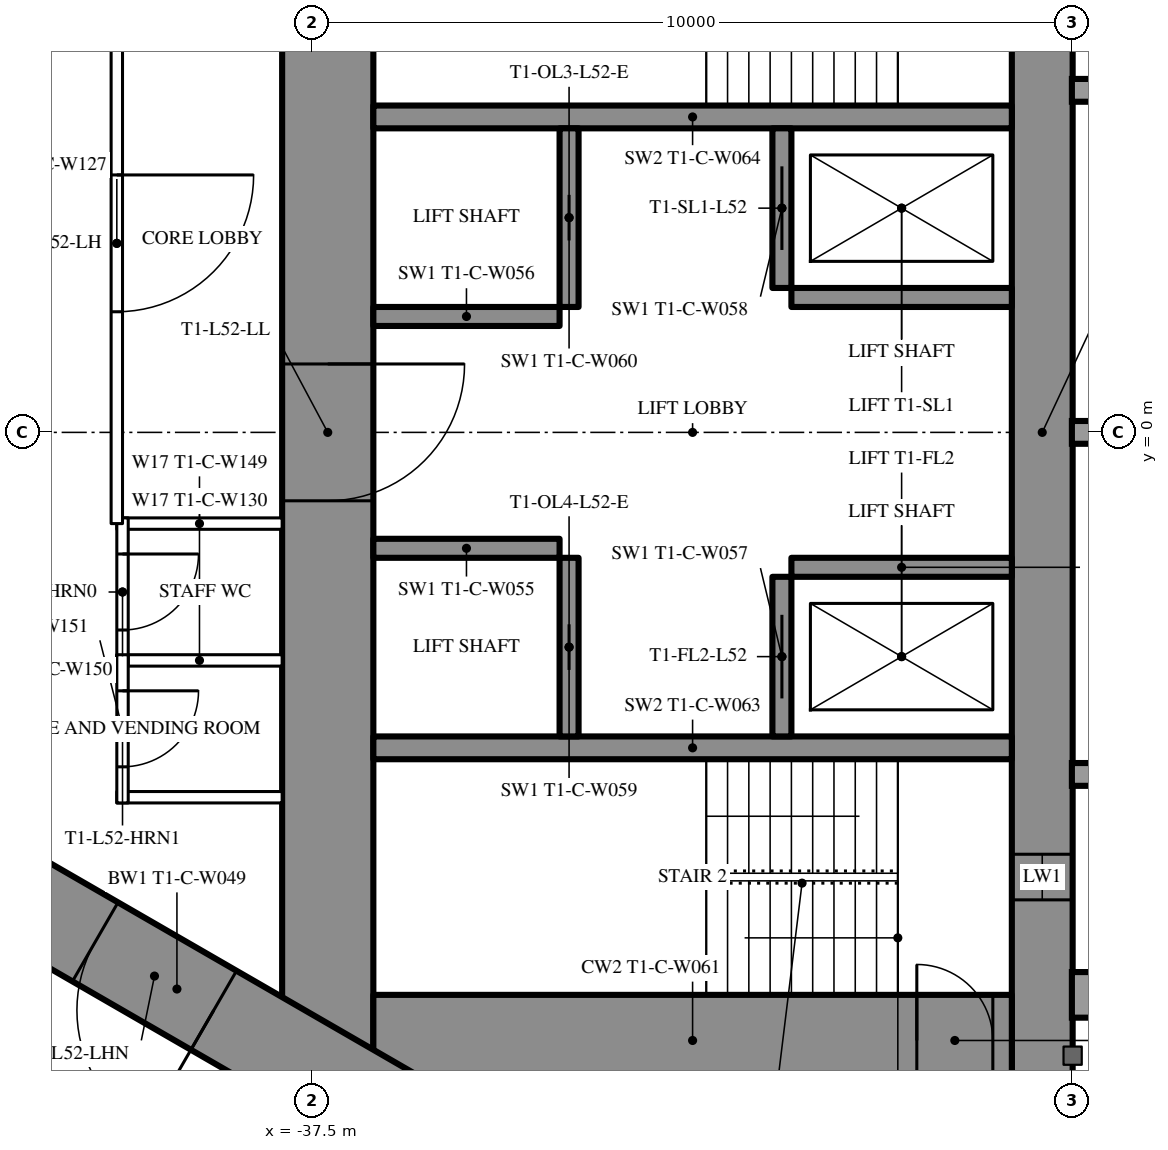
"""IFC4 building model, lengths in metres.
Left out: names, types, materials, properties, quantities, classifications, styles, units other than length and angle.
Written with IfcOpenShell. Run it as: python <this file> out.ifc"""

import sys

from ifc_helpers import new_model, si_unit, direction, frame, frame_2d, origin, place, context, subcontext, project, spatial, rectangle, extrude, element, fill, save


model = new_model("IFC4")
c1 = context("Model", 3, precision=1e-05, world=origin(), true_north=direction((0.0, 1.0)))
c2 = subcontext(c1, "Body", "Model", "MODEL_VIEW")
j1 = project(units=[si_unit("LENGTHUNIT", "METRE"), si_unit("PLANEANGLEUNIT", "RADIAN")], contexts=[c1])
p1 = place(None, origin())
s1 = spatial("IfcSite", under=j1, at=p1, CompositionType="ELEMENT")
p2 = place(p1, origin())
s2 = spatial("IfcBuilding", under=s1, at=p2, CompositionType="ELEMENT")
p3 = place(p2, frame((0.0, 0.0, 194.8)))
s3 = spatial("IfcBuildingStorey", under=s2, at=p3, CompositionType="ELEMENT", Elevation=194.8)
p4 = place(p3, frame((-27.9, 8.6, 0.0), z_axis=(0.0, 0.0, 1.0), x_axis=(0.0, -1.0, 0.0)))
e1 = element("IfcWall", 1, at=p4, inside=s3, PredefinedType="SHEAR", context=c2, shape_type="SweptSolid", body=[
    extrude(rectangle(XDim=17.2, YDim=0.8, at=frame_2d((8.6, 0.0))), origin(), (0.0, 0.0, 1.0), 3.5),
])
p5 = place(p4, frame((2.45, 0.0, 0.6)))
e2 = element("IfcOpeningElement", 2, at=p5, cuts=e1, PredefinedType="OPENING", context=c2, shape_type="SweptSolid", body=[
    extrude(rectangle(XDim=0.6, YDim=2.1, at=frame_2d((0.3, 1.05))), frame((0.0, 0.41, 0.0), z_axis=(0.0, -1.0, 0.0), x_axis=(1.0, 0.0, 0.0)), (0.0, 0.0, 1.0), 0.82),
])
p6 = place(p4, frame((14.15, 0.0, 0.6)))
e3 = element("IfcOpeningElement", 3, at=p6, cuts=e1, PredefinedType="OPENING", context=c2, shape_type="SweptSolid", body=[
    extrude(rectangle(XDim=0.6, YDim=2.1, at=frame_2d((0.3, 1.05))), frame((0.0, 0.41, 0.0), z_axis=(0.0, -1.0, 0.0), x_axis=(1.0, 0.0, 0.0)), (0.0, 0.0, 1.0), 0.82),
])
p7 = place(p3, frame((-37.3, 8.6, 0.0), z_axis=(0.0, 0.0, 1.0), x_axis=(0.0, -1.0, 0.0)))
e4 = element("IfcWall", 4, at=p7, inside=s3, PredefinedType="SHEAR", context=c2, shape_type="SweptSolid", body=[
    extrude(rectangle(XDim=17.2, YDim=1.2, at=frame_2d((8.6, 0.0))), origin(), (0.0, 0.0, 1.0), 3.5),
])
p8 = place(p7, frame((7.7, 0.0, 0.0)))
e5 = element("IfcOpeningElement", 5, at=p8, cuts=e4, PredefinedType="OPENING", context=c2, shape_type="SweptSolid", body=[
    extrude(rectangle(XDim=1.8, YDim=2.2, at=frame_2d((0.9, 1.1))), frame((0.0, 0.61, 0.0), z_axis=(0.0, -1.0, 0.0), x_axis=(1.0, 0.0, 0.0)), (0.0, 0.0, 1.0), 1.22),
])
p9 = place(p3, frame((-28.3, -8.0, 0.0), z_axis=(0.0, 0.0, 1.0), x_axis=(-1.0, 0.0, 0.0)))
e6 = element("IfcWall", 6, at=p9, inside=s3, PredefinedType="SHEAR", context=c2, shape_type="SweptSolid", body=[
    extrude(rectangle(XDim=8.4, YDim=1.2, at=frame_2d((4.2, 0.0))), origin(), (0.0, 0.0, 1.0), 3.5),
])
p10 = place(p9, frame((0.25, 0.0, 0.0)))
e7 = element("IfcOpeningElement", 7, at=p10, cuts=e6, PredefinedType="OPENING", context=c2, shape_type="SweptSolid", body=[
    extrude(rectangle(XDim=1.0, YDim=2.2, at=frame_2d((0.5, 1.1))), frame((0.0, 0.61, 0.0), z_axis=(0.0, -1.0, 0.0), x_axis=(1.0, 0.0, 0.0)), (0.0, 0.0, 1.0), 1.22),
])
for number, where, z_axis, x_axis in (
    (8, (-28.3, 4.15, 0.0), (0.0, 0.0, 1.0), (-1.0, 0.0, 0.0)),
    (9, (-28.3, -4.15, 0.0), (0.0, 0.0, 1.0), (-1.0, 0.0, 0.0)),
):
    element("IfcWall", number, at=place(p3, frame(where, z_axis=z_axis, x_axis=x_axis)), inside=s3, PredefinedType="SHEAR", context=c2, shape_type="SweptSolid", body=[
        extrude(rectangle(XDim=8.4, YDim=0.3, at=frame_2d((4.2, 0.0))), origin(), (0.0, 0.0, 1.0), 3.5),
    ])
p11 = place(p3, frame((-31.325, 4.0, 0.0), z_axis=(0.0, 0.0, 1.0), x_axis=(0.0, -1.0, 0.0)))
e10 = element("IfcWall", 10, at=p11, inside=s3, PredefinedType="SHEAR", context=c2, shape_type="SweptSolid", body=[
    extrude(rectangle(XDim=2.1, YDim=0.25, at=frame_2d((1.05, 0.0))), origin(), (0.0, 0.0, 1.0), 3.5),
])
p12 = place(p11, frame((0.5, 0.0, 0.0)))
e11 = element("IfcOpeningElement", 11, at=p12, cuts=e10, PredefinedType="OPENING", context=c2, shape_type="SweptSolid", body=[
    extrude(rectangle(XDim=1.1, YDim=2.2, at=frame_2d((0.55, 1.1))), frame((0.0, 0.135, 0.0), z_axis=(0.0, -1.0, 0.0), x_axis=(1.0, 0.0, 0.0)), (0.0, 0.0, 1.0), 0.27),
])
p13 = place(p3, frame((-34.125, 4.0, 0.0), z_axis=(0.0, 0.0, 1.0), x_axis=(0.0, -1.0, 0.0)))
e12 = element("IfcWall", 12, at=p13, inside=s3, PredefinedType="SHEAR", context=c2, shape_type="SweptSolid", body=[
    extrude(rectangle(XDim=2.35, YDim=0.25, at=frame_2d((1.175, 0.0))), origin(), (0.0, 0.0, 1.0), 3.5),
])
p14 = place(p13, frame((0.875, 0.0, 0.0)))
e13 = element("IfcOpeningElement", 13, at=p14, cuts=e12, PredefinedType="OPENING", context=c2, shape_type="SweptSolid", body=[
    extrude(rectangle(XDim=0.6, YDim=2.0, at=frame_2d((0.3, 1.0))), frame((0.0, 0.135, 0.0), z_axis=(0.0, -1.0, 0.0), x_axis=(1.0, 0.0, 0.0)), (0.0, 0.0, 1.0), 0.27),
])
p15 = place(p3, frame((-28.3, 1.775, 0.0), z_axis=(0.0, 0.0, 1.0), x_axis=(-1.0, 0.0, 0.0)))
e14 = element("IfcWall", 14, at=p15, inside=s3, PredefinedType="SHEAR", context=c2, shape_type="SweptSolid", body=[
    extrude(rectangle(XDim=2.9, YDim=0.25, at=frame_2d((1.45, 0.0))), origin(), (0.0, 0.0, 1.0), 3.5),
])
p16 = place(p3, frame((-34.25, 1.525, 0.0), z_axis=(0.0, 0.0, 1.0), x_axis=(-1.0, 0.0, 0.0)))
e15 = element("IfcWall", 15, at=p16, inside=s3, PredefinedType="SHEAR", context=c2, shape_type="SweptSolid", body=[
    extrude(rectangle(XDim=2.45, YDim=0.25, at=frame_2d((1.225, 0.0))), origin(), (0.0, 0.0, 1.0), 3.5),
])
p17 = place(p3, frame((-31.325, -1.9, 0.0), z_axis=(0.0, 0.0, 1.0), x_axis=(0.0, -1.0, 0.0)))
e16 = element("IfcWall", 16, at=p17, inside=s3, PredefinedType="SHEAR", context=c2, shape_type="SweptSolid", body=[
    extrude(rectangle(XDim=2.1, YDim=0.25, at=frame_2d((1.05, 0.0))), origin(), (0.0, 0.0, 1.0), 3.5),
])
p18 = place(p17, frame((0.5, 0.0, 0.0)))
e17 = element("IfcOpeningElement", 17, at=p18, cuts=e16, PredefinedType="OPENING", context=c2, shape_type="SweptSolid", body=[
    extrude(rectangle(XDim=1.1, YDim=2.2, at=frame_2d((0.55, 1.1))), frame((0.0, 0.135, 0.0), z_axis=(0.0, -1.0, 0.0), x_axis=(1.0, 0.0, 0.0)), (0.0, 0.0, 1.0), 0.27),
])
p19 = place(p3, frame((-34.125, -1.65, 0.0), z_axis=(0.0, 0.0, 1.0), x_axis=(0.0, -1.0, 0.0)))
e18 = element("IfcWall", 18, at=p19, inside=s3, PredefinedType="SHEAR", context=c2, shape_type="SweptSolid", body=[
    extrude(rectangle(XDim=2.35, YDim=0.25, at=frame_2d((1.175, 0.0))), origin(), (0.0, 0.0, 1.0), 3.5),
])
p20 = place(p19, frame((0.875, 0.0, 0.0)))
e19 = element("IfcOpeningElement", 19, at=p20, cuts=e18, PredefinedType="OPENING", context=c2, shape_type="SweptSolid", body=[
    extrude(rectangle(XDim=0.6, YDim=2.0, at=frame_2d((0.3, 1.0))), frame((0.0, 0.135, 0.0), z_axis=(0.0, -1.0, 0.0), x_axis=(1.0, 0.0, 0.0)), (0.0, 0.0, 1.0), 0.27),
])
p21 = place(p3, frame((-28.3, -1.775, 0.0), z_axis=(0.0, 0.0, 1.0), x_axis=(-1.0, 0.0, 0.0)))
e20 = element("IfcWall", 20, at=p21, inside=s3, PredefinedType="SHEAR", context=c2, shape_type="SweptSolid", body=[
    extrude(rectangle(XDim=2.9, YDim=0.25, at=frame_2d((1.45, 0.0))), origin(), (0.0, 0.0, 1.0), 3.5),
])
p22 = place(p3, frame((-34.25, -1.525, 0.0), z_axis=(0.0, 0.0, 1.0), x_axis=(-1.0, 0.0, 0.0)))
e21 = element("IfcWall", 21, at=p22, inside=s3, PredefinedType="SHEAR", context=c2, shape_type="SweptSolid", body=[
    extrude(rectangle(XDim=2.45, YDim=0.25, at=frame_2d((1.225, 0.0))), origin(), (0.0, 0.0, 1.0), 3.5),
])
p23 = place(p3, frame((-27.2, 14.3, 0.0), z_axis=(0.0, 0.0, 1.0), x_axis=(-0.866026593062, -0.499997940104, 0.0)))
e22 = element("IfcWall", 22, at=p23, inside=s3, PredefinedType="SHEAR", context=c2, shape_type="SweptSolid", body=[
    extrude(rectangle(XDim=28.946, YDim=1.2, at=frame_2d((14.473, 0.0))), origin(), (0.0, 0.0, 1.0), 3.5),
])
p24 = place(p23, frame((4.6, 0.0, 0.0)))
e23 = element("IfcOpeningElement", 23, at=p24, cuts=e22, PredefinedType="OPENING", context=c2, shape_type="SweptSolid", body=[
    extrude(rectangle(XDim=1.0, YDim=2.2, at=frame_2d((0.5, 1.1))), frame((0.0, 0.61, 0.0), z_axis=(0.0, -1.0, 0.0), x_axis=(1.0, 0.0, 0.0)), (0.0, 0.0, 1.0), 1.22),
])
p25 = place(p23, frame((13.395, 0.0, 0.0)))
e24 = element("IfcOpeningElement", 24, at=p25, cuts=e22, PredefinedType="OPENING", context=c2, shape_type="SweptSolid", body=[
    extrude(rectangle(XDim=1.8, YDim=2.2, at=frame_2d((0.9, 1.1))), frame((0.0, 0.61, 0.0), z_axis=(0.0, -1.0, 0.0), x_axis=(1.0, 0.0, 0.0)), (0.0, 0.0, 1.0), 1.22),
])
p26 = place(p3, frame((-27.2, -14.3, 0.0), z_axis=(0.0, 0.0, 1.0), x_axis=(-0.866024021859, 0.500002393557, 0.0)))
e25 = element("IfcWall", 25, at=p26, inside=s3, PredefinedType="SHEAR", context=c2, shape_type="SweptSolid", body=[
    extrude(rectangle(XDim=27.907, YDim=1.2, at=frame_2d((13.954, 0.0))), origin(), (0.0, 0.0, 1.0), 3.5),
])
p27 = place(p26, frame((4.6, 0.0, 0.0)))
e26 = element("IfcOpeningElement", 26, at=p27, cuts=e25, PredefinedType="OPENING", context=c2, shape_type="SweptSolid", body=[
    extrude(rectangle(XDim=1.0, YDim=2.2, at=frame_2d((0.5, 1.1))), frame((0.0, 0.61, 0.0), z_axis=(0.0, -1.0, 0.0), x_axis=(1.0, 0.0, 0.0)), (0.0, 0.0, 1.0), 1.22),
])
p28 = place(p26, frame((13.395, 0.0, 0.0)))
e27 = element("IfcOpeningElement", 27, at=p28, cuts=e25, PredefinedType="OPENING", context=c2, shape_type="SweptSolid", body=[
    extrude(rectangle(XDim=1.8, YDim=2.2, at=frame_2d((0.9, 1.1))), frame((0.0, 0.61, 0.0), z_axis=(0.0, -1.0, 0.0), x_axis=(1.0, 0.0, 0.0)), (0.0, 0.0, 1.0), 1.22),
])
p29 = place(p3, frame((-27.86, 16.575, 0.0), z_axis=(0.0, 0.0, 1.0), x_axis=(-0.866025533911, -0.499999774615, 0.0)))
e28 = element("IfcWall", 28, at=p29, inside=s3, PredefinedType="PARTITIONING", context=c2, shape_type="SweptSolid", body=[
    extrude(rectangle(XDim=33.149, YDim=0.2, at=frame_2d((16.575, 0.0))), origin(), (0.0, 0.0, 1.0), 3.25),
])
p30 = place(p29, frame((3.75, 0.0, 0.0)))
e29 = element("IfcOpeningElement", 29, at=p30, cuts=e28, PredefinedType="OPENING", context=c2, shape_type="SweptSolid", body=[
    extrude(rectangle(XDim=1.0, YDim=2.2, at=frame_2d((0.5, 1.1))), frame((0.0, 0.11, 0.0), z_axis=(0.0, -1.0, 0.0), x_axis=(1.0, 0.0, 0.0)), (0.0, 0.0, 1.0), 0.22),
])
p31 = place(p29, frame((16.402, 0.0, 0.0)))
e30 = element("IfcOpeningElement", 30, at=p31, cuts=e28, PredefinedType="OPENING", context=c2, shape_type="SweptSolid", body=[
    extrude(rectangle(XDim=0.95, YDim=2.2, at=frame_2d((0.475, 1.1))), frame((0.0, 0.11, 0.0), z_axis=(0.0, -1.0, 0.0), x_axis=(1.0, 0.0, 0.0)), (0.0, 0.0, 1.0), 0.22),
])
p32 = place(p29, frame((22.047, 0.0, 0.0)))
e31 = element("IfcOpeningElement", 31, at=p32, cuts=e28, PredefinedType="OPENING", context=c2, shape_type="SweptSolid", body=[
    extrude(rectangle(XDim=0.95, YDim=2.2, at=frame_2d((0.475, 1.1))), frame((0.0, 0.11, 0.0), z_axis=(0.0, -1.0, 0.0), x_axis=(1.0, 0.0, 0.0)), (0.0, 0.0, 1.0), 0.22),
])
p33 = place(p29, frame((30.396, 0.0, 0.0)))
e32 = element("IfcOpeningElement", 32, at=p33, cuts=e28, PredefinedType="OPENING", context=c2, shape_type="SweptSolid", body=[
    extrude(rectangle(XDim=1.8, YDim=2.2, at=frame_2d((0.9, 1.1))), frame((0.0, 0.11, 0.0), z_axis=(0.0, -1.0, 0.0), x_axis=(1.0, 0.0, 0.0)), (0.0, 0.0, 1.0), 0.22),
])
for number, where, z_axis, x_axis in (
    (33, (-37.9, -1.2, 0.0), (0.0, 0.0, 1.0), (-1.0, 0.0, 0.0)),
    (34, (-37.9, -3.0, 0.0), (0.0, 0.0, 1.0), (-1.0, 0.0, 0.0)),
    (35, (-37.9, -4.8, 0.0), (0.0, 0.0, 1.0), (-1.0, 0.0, 0.0)),
):
    element("IfcWall", number, at=place(p3, frame(where, z_axis=z_axis, x_axis=x_axis)), inside=s3, PredefinedType="PARTITIONING", context=c2, shape_type="SweptSolid", body=[
        extrude(rectangle(XDim=2.175, YDim=0.15, at=frame_2d((1.087, 0.0))), origin(), (0.0, 0.0, 1.0), 3.25),
    ])
p34 = place(p3, frame((-40.0, -1.125, 0.0), z_axis=(0.0, 0.0, 1.0), x_axis=(0.0, -1.0, 0.0)))
e36 = element("IfcWall", 36, at=p34, inside=s3, PredefinedType="PARTITIONING", context=c2, shape_type="SweptSolid", body=[
    extrude(rectangle(XDim=1.95, YDim=0.15, at=frame_2d((0.975, 0.0))), origin(), (0.0, 0.0, 1.0), 3.25),
])
p35 = place(p34, frame((0.475, 0.0, 0.0)))
e37 = element("IfcOpeningElement", 37, at=p35, cuts=e36, PredefinedType="OPENING", context=c2, shape_type="SweptSolid", body=[
    extrude(rectangle(XDim=1.0, YDim=2.2, at=frame_2d((0.5, 1.1))), frame((0.0, 0.085, 0.0), z_axis=(0.0, -1.0, 0.0), x_axis=(1.0, 0.0, 0.0)), (0.0, 0.0, 1.0), 0.17),
])
p36 = place(p3, frame((-40.0, -2.925, 0.0), z_axis=(0.0, 0.0, 1.0), x_axis=(0.0, -1.0, 0.0)))
e38 = element("IfcWall", 38, at=p36, inside=s3, PredefinedType="PARTITIONING", context=c2, shape_type="SweptSolid", body=[
    extrude(rectangle(XDim=1.95, YDim=0.15, at=frame_2d((0.975, 0.0))), origin(), (0.0, 0.0, 1.0), 3.25),
])
p37 = place(p36, frame((0.475, 0.0, 0.0)))
e39 = element("IfcOpeningElement", 39, at=p37, cuts=e38, PredefinedType="OPENING", context=c2, shape_type="SweptSolid", body=[
    extrude(rectangle(XDim=1.0, YDim=2.2, at=frame_2d((0.5, 1.1))), frame((0.0, 0.085, 0.0), z_axis=(0.0, -1.0, 0.0), x_axis=(1.0, 0.0, 0.0)), (0.0, 0.0, 1.0), 0.17),
])
p38 = place(p3, frame((-40.075, 6.174, 0.0), z_axis=(0.0, 0.0, 1.0), x_axis=(0.0, -1.0, 0.0)))
e40 = element("IfcWall", 40, at=p38, inside=s3, PredefinedType="PARTITIONING", context=c2, shape_type="SweptSolid", body=[
    extrude(rectangle(XDim=7.374, YDim=0.15, at=frame_2d((3.687, 0.0))), origin(), (0.0, 0.0, 1.0), 3.25),
])
p39 = place(p38, frame((2.787, 0.0, 0.0)))
e41 = element("IfcOpeningElement", 41, at=p39, cuts=e40, PredefinedType="OPENING", context=c2, shape_type="SweptSolid", body=[
    extrude(rectangle(XDim=1.8, YDim=2.2, at=frame_2d((0.9, 1.1))), frame((0.0, 0.085, 0.0), z_axis=(0.0, -1.0, 0.0), x_axis=(1.0, 0.0, 0.0)), (0.0, 0.0, 1.0), 0.17),
])
p40 = place(p3, frame((-39.758, -11.697, 0.0), z_axis=(0.0, 0.0, 1.0), x_axis=(-0.866024194504, 0.500002094529, 0.0)))
e42 = element("IfcWall", 42, at=p40, inside=s3, PredefinedType="PARTITIONING", context=c2, shape_type="SweptSolid", body=[
    extrude(rectangle(XDim=6.6, YDim=0.25, at=frame_2d((3.3, 0.0))), origin(), (0.0, 0.0, 1.0), 3.25),
])
p41 = place(p40, frame((0.75, 0.0, 0.0)))
e43 = element("IfcOpeningElement", 43, at=p41, cuts=e42, PredefinedType="OPENING", context=c2, shape_type="SweptSolid", body=[
    extrude(rectangle(XDim=1.1, YDim=2.2, at=frame_2d((0.55, 1.1))), frame((0.0, 0.135, 0.0), z_axis=(0.0, -1.0, 0.0), x_axis=(1.0, 0.0, 0.0)), (0.0, 0.0, 1.0), 0.27),
])
p42 = place(p40, frame((2.75, 0.0, 0.0)))
e44 = element("IfcOpeningElement", 44, at=p42, cuts=e42, PredefinedType="OPENING", context=c2, shape_type="SweptSolid", body=[
    extrude(rectangle(XDim=1.1, YDim=2.2, at=frame_2d((0.55, 1.1))), frame((0.0, 0.135, 0.0), z_axis=(0.0, -1.0, 0.0), x_axis=(1.0, 0.0, 0.0)), (0.0, 0.0, 1.0), 0.27),
])
p43 = place(p40, frame((4.75, 0.0, 0.0)))
e45 = element("IfcOpeningElement", 45, at=p43, cuts=e42, PredefinedType="OPENING", context=c2, shape_type="SweptSolid", body=[
    extrude(rectangle(XDim=1.1, YDim=2.2, at=frame_2d((0.55, 1.1))), frame((0.0, 0.135, 0.0), z_axis=(0.0, -1.0, 0.0), x_axis=(1.0, 0.0, 0.0)), (0.0, 0.0, 1.0), 0.27),
])
p44 = place(p35, origin())
e46 = element("IfcDoor", 46, at=p44, inside=s3, OperationType="SINGLE_SWING_LEFT", PredefinedType="DOOR", context=c2, shape_type="SweptSolid", body=[
    extrude(rectangle(XDim=1.0, YDim=2.2, at=frame_2d((0.5, 1.1))), frame((0.0, 0.025, 0.0), z_axis=(0.0, -1.0, 0.0), x_axis=(1.0, 0.0, 0.0)), (0.0, 0.0, 1.0), 0.05),
])
fill(e37, e46)
p45 = place(p37, origin())
e47 = element("IfcDoor", 47, at=p45, inside=s3, OperationType="SINGLE_SWING_LEFT", PredefinedType="DOOR", context=c2, shape_type="SweptSolid", body=[
    extrude(rectangle(XDim=1.0, YDim=2.2, at=frame_2d((0.5, 1.1))), frame((0.0, 0.025, 0.0), z_axis=(0.0, -1.0, 0.0), x_axis=(1.0, 0.0, 0.0)), (0.0, 0.0, 1.0), 0.05),
])
fill(e39, e47)
p46 = place(p39, origin())
e48 = element("IfcDoor", 48, at=p46, inside=s3, OperationType="DOUBLE_DOOR_SINGLE_SWING", PredefinedType="DOOR", context=c2, shape_type="SweptSolid", body=[
    extrude(rectangle(XDim=1.8, YDim=2.2, at=frame_2d((0.9, 1.1))), frame((0.0, 0.025, 0.0), z_axis=(0.0, -1.0, 0.0), x_axis=(1.0, 0.0, 0.0)), (0.0, 0.0, 1.0), 0.05),
])
fill(e41, e48)
p47 = place(p28, origin())
e49 = element("IfcDoor", 49, at=p47, inside=s3, OperationType="DOUBLE_DOOR_SINGLE_SWING", PredefinedType="DOOR", context=c2, shape_type="SweptSolid", body=[
    extrude(rectangle(XDim=1.8, YDim=2.2, at=frame_2d((0.9, 1.1))), frame((0.0, 0.025, 0.0), z_axis=(0.0, -1.0, 0.0), x_axis=(1.0, 0.0, 0.0)), (0.0, 0.0, 1.0), 0.05),
])
fill(e27, e49)
p48 = place(p8, origin())
e50 = element("IfcDoor", 50, at=p48, inside=s3, OperationType="DOUBLE_DOOR_SINGLE_SWING", PredefinedType="DOOR", context=c2, shape_type="SweptSolid", body=[
    extrude(rectangle(XDim=1.8, YDim=2.2, at=frame_2d((0.9, 1.1))), frame((0.0, 0.025, 0.0), z_axis=(0.0, -1.0, 0.0), x_axis=(1.0, 0.0, 0.0)), (0.0, 0.0, 1.0), 0.05),
])
fill(e5, e50)
p49 = place(p10, origin())
e51 = element("IfcDoor", 51, at=p49, inside=s3, OperationType="SINGLE_SWING_RIGHT", PredefinedType="DOOR", context=c2, shape_type="SweptSolid", body=[
    extrude(rectangle(XDim=1.0, YDim=2.2, at=frame_2d((0.5, 1.1))), frame((0.0, 0.025, 0.0), z_axis=(0.0, -1.0, 0.0), x_axis=(1.0, 0.0, 0.0)), (0.0, 0.0, 1.0), 0.05),
])
fill(e7, e51)
p50 = place(p12, origin())
e52 = element("IfcDoor", 52, at=p50, inside=s3, OperationType="SLIDING_TO_LEFT", PredefinedType="USERDEFINED", context=c2, shape_type="SweptSolid", body=[
    extrude(rectangle(XDim=1.1, YDim=2.2, at=frame_2d((0.55, 1.1))), frame((0.0, 0.025, 0.0), z_axis=(0.0, -1.0, 0.0), x_axis=(1.0, 0.0, 0.0)), (0.0, 0.0, 1.0), 0.05),
])
fill(e11, e52)
p51 = place(p18, origin())
e53 = element("IfcDoor", 53, at=p51, inside=s3, OperationType="SLIDING_TO_LEFT", PredefinedType="USERDEFINED", context=c2, shape_type="SweptSolid", body=[
    extrude(rectangle(XDim=1.1, YDim=2.2, at=frame_2d((0.55, 1.1))), frame((0.0, 0.025, 0.0), z_axis=(0.0, -1.0, 0.0), x_axis=(1.0, 0.0, 0.0)), (0.0, 0.0, 1.0), 0.05),
])
fill(e17, e53)
p52 = place(p14, origin())
e54 = element("IfcDoor", 54, at=p52, inside=s3, OperationType="SLIDING_TO_LEFT", PredefinedType="DOOR", context=c2, shape_type="SweptSolid", body=[
    extrude(rectangle(XDim=0.6, YDim=2.0, at=frame_2d((0.3, 1.0))), frame((0.0, 0.025, 0.0), z_axis=(0.0, -1.0, 0.0), x_axis=(1.0, 0.0, 0.0)), (0.0, 0.0, 1.0), 0.05),
])
fill(e13, e54)
p53 = place(p20, origin())
e55 = element("IfcDoor", 55, at=p53, inside=s3, OperationType="SLIDING_TO_LEFT", PredefinedType="DOOR", context=c2, shape_type="SweptSolid", body=[
    extrude(rectangle(XDim=0.6, YDim=2.0, at=frame_2d((0.3, 1.0))), frame((0.0, 0.025, 0.0), z_axis=(0.0, -1.0, 0.0), x_axis=(1.0, 0.0, 0.0)), (0.0, 0.0, 1.0), 0.05),
])
fill(e19, e55)
p54 = place(p6, origin())
e56 = element("IfcWindow", 56, at=p54, inside=s3, PartitioningType="SINGLE_PANEL", PredefinedType="WINDOW", context=c2, shape_type="SweptSolid", body=[
    extrude(rectangle(XDim=0.6, YDim=2.1, at=frame_2d((0.3, 1.05))), frame((0.0, 0.03, 0.0), z_axis=(0.0, -1.0, 0.0), x_axis=(1.0, 0.0, 0.0)), (0.0, 0.0, 1.0), 0.06),
])
fill(e3, e56)
save(model, sys.argv[1])
